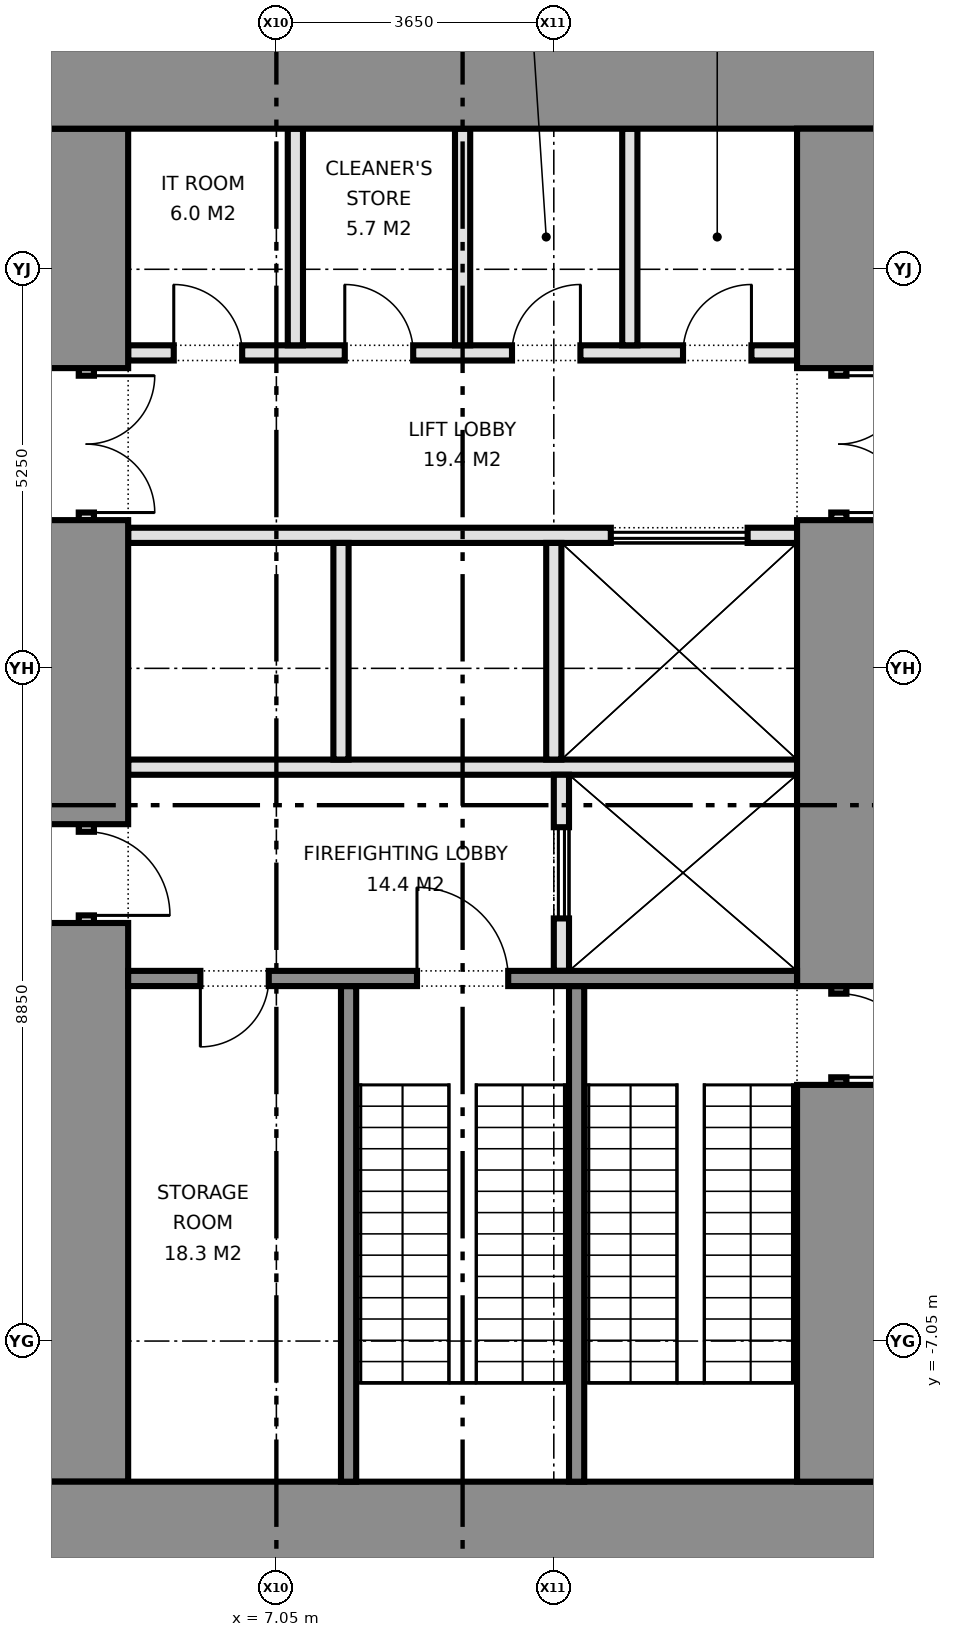
"""IFC4 building model, lengths in metres.
Left out: names, types, materials, properties, quantities, classifications, styles, units other than length and angle.
Written with IfcOpenShell. Run it as: python <this file> out.ifc"""

import sys

from ifc_helpers import new_model, si_unit, direction, frame, frame_2d, origin, place, context, subcontext, project, spatial, rectangle, extrude, element, fill, save


model = new_model("IFC4")
c1 = context("Model", 3, precision=1e-05, world=origin(), true_north=direction((0.0, 1.0)))
c2 = subcontext(c1, "Body", "Model", "MODEL_VIEW")
j1 = project(units=[si_unit("LENGTHUNIT", "METRE"), si_unit("PLANEANGLEUNIT", "RADIAN")], contexts=[c1])
p1 = place(None, origin())
s1 = spatial("IfcSite", under=j1, at=p1, CompositionType="ELEMENT")
p2 = place(p1, origin())
s2 = spatial("IfcBuilding", under=s1, at=p2, CompositionType="ELEMENT")
p3 = place(p2, frame((0.0, 0.0, -10.0)))
s3 = spatial("IfcBuildingStorey", under=s2, at=p3, CompositionType="ELEMENT", Elevation=-10.0)
for number, where, z_axis, x_axis in (
    (1, (15.0, 9.45, 0.0), (0.0, 0.0, 1.0), (-1.0, 0.0, 0.0)),
    (2, (15.0, -9.45, 0.0), (0.0, 0.0, 1.0), (-1.0, 0.0, 0.0)),
):
    element("IfcWall", number, at=place(p3, frame(where, z_axis=z_axis, x_axis=x_axis)), inside=s3, PredefinedType="SHEAR", context=c2, shape_type="SweptSolid", body=[
        extrude(rectangle(XDim=11.0, YDim=1.1, at=frame_2d((5.5, 0.0))), origin(), (0.0, 0.0, 1.0), 4.7),
    ])
p4 = place(p3, frame((14.45, 8.9, 0.0), z_axis=(0.0, 0.0, 1.0), x_axis=(0.0, -1.0, 0.0)))
e3 = element("IfcWall", 3, at=p4, inside=s3, PredefinedType="SHEAR", context=c2, shape_type="SweptSolid", body=[
    extrude(rectangle(XDim=3.15, YDim=1.1, at=frame_2d((1.575, 0.0))), origin(), (0.0, 0.0, 1.0), 4.7),
])
p5 = place(p3, frame((14.45, 5.75, 0.0), z_axis=(0.0, 0.0, 1.0), x_axis=(0.0, -1.0, 0.0)))
e4 = element("IfcWall", 4, at=p5, inside=s3, PredefinedType="PARTITIONING", context=c2, shape_type="SweptSolid", body=[
    extrude(rectangle(XDim=2.0, YDim=0.2, at=frame_2d((1.0, 0.0))), origin(), (0.0, 0.0, 1.0), 2.4),
])
p6 = place(p5, frame((0.1, 0.0, 0.0)))
e5 = element("IfcOpeningElement", 5, at=p6, cuts=e4, PredefinedType="OPENING", context=c2, shape_type="SweptSolid", body=[
    extrude(rectangle(XDim=1.8, YDim=2.1, at=frame_2d((0.9, 1.05))), frame((0.0, 0.11, 0.0), z_axis=(0.0, -1.0, 0.0), x_axis=(1.0, 0.0, 0.0)), (0.0, 0.0, 1.0), 0.22),
])
p7 = place(p3, frame((14.45, 3.75, 0.0), z_axis=(0.0, 0.0, 1.0), x_axis=(0.0, -1.0, 0.0)))
e6 = element("IfcWall", 6, at=p7, inside=s3, PredefinedType="SHEAR", context=c2, shape_type="SweptSolid", body=[
    extrude(rectangle(XDim=6.13, YDim=1.1, at=frame_2d((3.065, 0.0))), origin(), (0.0, 0.0, 1.0), 4.7),
])
p8 = place(p3, frame((14.45, -2.38, 0.0), z_axis=(0.0, 0.0, 1.0), x_axis=(0.0, -1.0, 0.0)))
e7 = element("IfcWall", 7, at=p8, inside=s3, PredefinedType="SHEAR", context=c2, shape_type="SweptSolid", body=[
    extrude(rectangle(XDim=1.3, YDim=0.2, at=frame_2d((0.65, 0.0))), origin(), (0.0, 0.0, 1.0), 2.4),
])
p9 = place(p8, frame((0.1, 0.0, 0.0)))
e8 = element("IfcOpeningElement", 8, at=p9, cuts=e7, PredefinedType="OPENING", context=c2, shape_type="SweptSolid", body=[
    extrude(rectangle(XDim=1.1, YDim=2.1, at=frame_2d((0.55, 1.05))), frame((0.0, 0.11, 0.0), z_axis=(0.0, -1.0, 0.0), x_axis=(1.0, 0.0, 0.0)), (0.0, 0.0, 1.0), 0.22),
])
p10 = place(p3, frame((14.45, -3.68, 0.0), z_axis=(0.0, 0.0, 1.0), x_axis=(0.0, -1.0, 0.0)))
e9 = element("IfcWall", 9, at=p10, inside=s3, PredefinedType="SHEAR", context=c2, shape_type="SweptSolid", body=[
    extrude(rectangle(XDim=5.22, YDim=1.1, at=frame_2d((2.61, 0.0))), origin(), (0.0, 0.0, 1.0), 4.7),
])
p11 = place(p3, frame((4.55, 8.9, 0.0), z_axis=(0.0, 0.0, 1.0), x_axis=(0.0, -1.0, 0.0)))
e10 = element("IfcWall", 10, at=p11, inside=s3, PredefinedType="SHEAR", context=c2, shape_type="SweptSolid", body=[
    extrude(rectangle(XDim=3.15, YDim=1.1, at=frame_2d((1.575, 0.0))), origin(), (0.0, 0.0, 1.0), 4.7),
])
p12 = place(p3, frame((4.55, 5.75, 0.0), z_axis=(0.0, 0.0, 1.0), x_axis=(0.0, -1.0, 0.0)))
e11 = element("IfcWall", 11, at=p12, inside=s3, PredefinedType="PARTITIONING", context=c2, shape_type="SweptSolid", body=[
    extrude(rectangle(XDim=2.0, YDim=0.2, at=frame_2d((1.0, 0.0))), origin(), (0.0, 0.0, 1.0), 2.4),
])
p13 = place(p12, frame((0.1, 0.0, 0.0)))
e12 = element("IfcOpeningElement", 12, at=p13, cuts=e11, PredefinedType="OPENING", context=c2, shape_type="SweptSolid", body=[
    extrude(rectangle(XDim=1.8, YDim=2.1, at=frame_2d((0.9, 1.05))), frame((0.0, 0.11, 0.0), z_axis=(0.0, -1.0, 0.0), x_axis=(1.0, 0.0, 0.0)), (0.0, 0.0, 1.0), 0.22),
])
p14 = place(p3, frame((4.55, 3.75, 0.0), z_axis=(0.0, 0.0, 1.0), x_axis=(0.0, -1.0, 0.0)))
e13 = element("IfcWall", 13, at=p14, inside=s3, PredefinedType="SHEAR", context=c2, shape_type="SweptSolid", body=[
    extrude(rectangle(XDim=4.0, YDim=1.1, at=frame_2d((2.0, 0.0))), origin(), (0.0, 0.0, 1.0), 4.7),
])
p15 = place(p3, frame((4.55, -0.25, 0.0), z_axis=(0.0, 0.0, 1.0), x_axis=(0.0, -1.0, 0.0)))
e14 = element("IfcWall", 14, at=p15, inside=s3, PredefinedType="PARTITIONING", context=c2, shape_type="SweptSolid", body=[
    extrude(rectangle(XDim=1.3, YDim=0.2, at=frame_2d((0.65, 0.0))), origin(), (0.0, 0.0, 1.0), 2.4),
])
p16 = place(p15, frame((0.1, 0.0, 0.0)))
e15 = element("IfcOpeningElement", 15, at=p16, cuts=e14, PredefinedType="OPENING", context=c2, shape_type="SweptSolid", body=[
    extrude(rectangle(XDim=1.1, YDim=2.1, at=frame_2d((0.55, 1.05))), frame((0.0, 0.11, 0.0), z_axis=(0.0, -1.0, 0.0), x_axis=(1.0, 0.0, 0.0)), (0.0, 0.0, 1.0), 0.22),
])
p17 = place(p3, frame((4.55, -1.55, 0.0), z_axis=(0.0, 0.0, 1.0), x_axis=(0.0, -1.0, 0.0)))
e16 = element("IfcWall", 16, at=p17, inside=s3, PredefinedType="SHEAR", context=c2, shape_type="SweptSolid", body=[
    extrude(rectangle(XDim=7.35, YDim=1.1, at=frame_2d((3.675, 0.0))), origin(), (0.0, 0.0, 1.0), 4.7),
])
p18 = place(p3, frame((13.9, 5.95, 0.0), z_axis=(0.0, 0.0, 1.0), x_axis=(-1.0, 0.0, 0.0)))
e17 = element("IfcWall", 17, at=p18, inside=s3, PredefinedType="PARTITIONING", context=c2, shape_type="SweptSolid", body=[
    extrude(rectangle(XDim=8.8, YDim=0.2, at=frame_2d((4.4, 0.0))), origin(), (0.0, 0.0, 1.0), 4.7),
])
p19 = place(p18, frame((0.6, 0.0, 0.0)))
e18 = element("IfcOpeningElement", 18, at=p19, cuts=e17, PredefinedType="OPENING", context=c2, shape_type="SweptSolid", body=[
    extrude(rectangle(XDim=0.9, YDim=2.1, at=frame_2d((0.45, 1.05))), frame((0.0, 0.11, 0.0), z_axis=(0.0, -1.0, 0.0), x_axis=(1.0, 0.0, 0.0)), (0.0, 0.0, 1.0), 0.22),
])
p20 = place(p18, frame((2.85, 0.0, 0.0)))
e19 = element("IfcOpeningElement", 19, at=p20, cuts=e17, PredefinedType="OPENING", context=c2, shape_type="SweptSolid", body=[
    extrude(rectangle(XDim=0.9, YDim=2.1, at=frame_2d((0.45, 1.05))), frame((0.0, 0.11, 0.0), z_axis=(0.0, -1.0, 0.0), x_axis=(1.0, 0.0, 0.0)), (0.0, 0.0, 1.0), 0.22),
])
p21 = place(p18, frame((5.05, 0.0, 0.0)))
e20 = element("IfcOpeningElement", 20, at=p21, cuts=e17, PredefinedType="OPENING", context=c2, shape_type="SweptSolid", body=[
    extrude(rectangle(XDim=0.9, YDim=2.1, at=frame_2d((0.45, 1.05))), frame((0.0, 0.11, 0.0), z_axis=(0.0, -1.0, 0.0), x_axis=(1.0, 0.0, 0.0)), (0.0, 0.0, 1.0), 0.22),
])
p22 = place(p18, frame((7.3, 0.0, 0.0)))
e21 = element("IfcOpeningElement", 21, at=p22, cuts=e17, PredefinedType="OPENING", context=c2, shape_type="SweptSolid", body=[
    extrude(rectangle(XDim=0.9, YDim=2.1, at=frame_2d((0.45, 1.05))), frame((0.0, 0.11, 0.0), z_axis=(0.0, -1.0, 0.0), x_axis=(1.0, 0.0, 0.0)), (0.0, 0.0, 1.0), 0.22),
])
p23 = place(p3, frame((13.9, 3.55, 0.0), z_axis=(0.0, 0.0, 1.0), x_axis=(-1.0, 0.0, 0.0)))
e22 = element("IfcWall", 22, at=p23, inside=s3, PredefinedType="PARTITIONING", context=c2, shape_type="SweptSolid", body=[
    extrude(rectangle(XDim=8.8, YDim=0.2, at=frame_2d((4.4, 0.0))), origin(), (0.0, 0.0, 1.0), 4.7),
])
p24 = place(p23, frame((0.65, 0.0, 0.0)))
e23 = element("IfcOpeningElement", 23, at=p24, cuts=e22, PredefinedType="OPENING", context=c2, shape_type="SweptSolid", body=[
    extrude(rectangle(XDim=1.8, YDim=2.1, at=frame_2d((0.9, 1.05))), frame((0.0, 0.11, 0.0), z_axis=(0.0, -1.0, 0.0), x_axis=(1.0, 0.0, 0.0)), (0.0, 0.0, 1.0), 0.22),
])
p25 = place(p3, frame((13.9, 0.5, 0.0), z_axis=(0.0, 0.0, 1.0), x_axis=(-1.0, 0.0, 0.0)))
e24 = element("IfcWall", 24, at=p25, inside=s3, PredefinedType="PARTITIONING", context=c2, shape_type="SweptSolid", body=[
    extrude(rectangle(XDim=8.8, YDim=0.2, at=frame_2d((4.4, 0.0))), origin(), (0.0, 0.0, 1.0), 4.7),
])
p26 = place(p3, frame((10.8, 0.4, 0.0), z_axis=(0.0, 0.0, 1.0), x_axis=(0.0, -1.0, 0.0)))
e25 = element("IfcWall", 25, at=p26, inside=s3, PredefinedType="PARTITIONING", context=c2, shape_type="SweptSolid", body=[
    extrude(rectangle(XDim=2.58, YDim=0.2, at=frame_2d((1.29, 0.0))), origin(), (0.0, 0.0, 1.0), 4.7),
])
p27 = place(p26, frame((0.69, 0.0, 0.0)))
e26 = element("IfcOpeningElement", 26, at=p27, cuts=e25, PredefinedType="OPENING", context=c2, shape_type="SweptSolid", body=[
    extrude(rectangle(XDim=1.2, YDim=2.1, at=frame_2d((0.6, 1.05))), frame((0.0, 0.11, 0.0), z_axis=(0.0, -1.0, 0.0), x_axis=(1.0, 0.0, 0.0)), (0.0, 0.0, 1.0), 0.22),
])
p28 = place(p3, frame((13.9, -2.28, 0.0), z_axis=(0.0, 0.0, 1.0), x_axis=(-1.0, 0.0, 0.0)))
e27 = element("IfcWall", 27, at=p28, inside=s3, PredefinedType="SHEAR", context=c2, shape_type="SweptSolid", body=[
    extrude(rectangle(XDim=8.8, YDim=0.2, at=frame_2d((4.4, 0.0))), origin(), (0.0, 0.0, 1.0), 4.7),
])
p29 = place(p28, frame((3.8, 0.0, 0.0)))
e28 = element("IfcOpeningElement", 28, at=p29, cuts=e27, PredefinedType="OPENING", context=c2, shape_type="SweptSolid", body=[
    extrude(rectangle(XDim=1.2, YDim=2.1, at=frame_2d((0.6, 1.05))), frame((0.0, 0.11, 0.0), z_axis=(0.0, -1.0, 0.0), x_axis=(1.0, 0.0, 0.0)), (0.0, 0.0, 1.0), 0.22),
])
p30 = place(p28, frame((6.95, 0.0, 0.0)))
e29 = element("IfcOpeningElement", 29, at=p30, cuts=e27, PredefinedType="OPENING", context=c2, shape_type="SweptSolid", body=[
    extrude(rectangle(XDim=0.9, YDim=2.1, at=frame_2d((0.45, 1.05))), frame((0.0, 0.11, 0.0), z_axis=(0.0, -1.0, 0.0), x_axis=(1.0, 0.0, 0.0)), (0.0, 0.0, 1.0), 0.22),
])
for number, where, z_axis, x_axis in (
    (30, (11.0, -2.38, 0.0), (0.0, 0.0, 1.0), (0.0, -1.0, 0.0)),
    (31, (8.0, -2.38, 0.0), (0.0, 0.0, 1.0), (0.0, -1.0, 0.0)),
):
    element("IfcWall", number, at=place(p3, frame(where, z_axis=z_axis, x_axis=x_axis)), inside=s3, PredefinedType="SHEAR", context=c2, shape_type="SweptSolid", body=[
        extrude(rectangle(XDim=6.52, YDim=0.2, at=frame_2d((3.26, 0.0))), origin(), (0.0, 0.0, 1.0), 4.7),
    ])
for number, where, z_axis, x_axis in (
    (32, (11.7, 8.9, 0.0), (0.0, 0.0, 1.0), (0.0, -1.0, 0.0)),
    (33, (9.5, 8.9, 0.0), (0.0, 0.0, 1.0), (0.0, -1.0, 0.0)),
    (34, (7.3, 8.9, 0.0), (0.0, 0.0, 1.0), (0.0, -1.0, 0.0)),
    (35, (10.7, 3.45, 0.0), (0.0, 0.0, 1.0), (0.0, -1.0, 0.0)),
    (36, (7.9, 3.45, 0.0), (0.0, 0.0, 1.0), (0.0, -1.0, 0.0)),
):
    element("IfcWall", number, at=place(p3, frame(where, z_axis=z_axis, x_axis=x_axis)), inside=s3, PredefinedType="PARTITIONING", context=c2, shape_type="SweptSolid", body=[
        extrude(rectangle(XDim=2.85, YDim=0.2, at=frame_2d((1.425, 0.0))), origin(), (0.0, 0.0, 1.0), 4.7),
    ])
p31 = place(p6, origin())
e37 = element("IfcDoor", 37, at=p31, inside=s3, OperationType="DOUBLE_DOOR_SINGLE_SWING", PredefinedType="DOOR", context=c2, shape_type="SweptSolid", body=[
    extrude(rectangle(XDim=1.8, YDim=2.1, at=frame_2d((0.9, 1.05))), frame((0.0, 0.025, 0.0), z_axis=(0.0, -1.0, 0.0), x_axis=(1.0, 0.0, 0.0)), (0.0, 0.0, 1.0), 0.05),
])
fill(e5, e37)
p32 = place(p9, origin())
e38 = element("IfcDoor", 38, at=p32, inside=s3, OperationType="SINGLE_SWING_RIGHT", PredefinedType="DOOR", context=c2, shape_type="SweptSolid", body=[
    extrude(rectangle(XDim=1.1, YDim=2.1, at=frame_2d((0.55, 1.05))), frame((0.0, 0.025, 0.0), z_axis=(0.0, -1.0, 0.0), x_axis=(1.0, 0.0, 0.0)), (0.0, 0.0, 1.0), 0.05),
])
fill(e8, e38)
p33 = place(p13, origin())
e39 = element("IfcDoor", 39, at=p33, inside=s3, OperationType="DOUBLE_DOOR_SINGLE_SWING", PredefinedType="DOOR", context=c2, shape_type="SweptSolid", body=[
    extrude(rectangle(XDim=1.8, YDim=2.1, at=frame_2d((0.9, 1.05))), frame((0.0, 0.025, 0.0), z_axis=(0.0, -1.0, 0.0), x_axis=(1.0, 0.0, 0.0)), (0.0, 0.0, 1.0), 0.05),
])
fill(e12, e39)
p34 = place(p16, origin())
e40 = element("IfcDoor", 40, at=p34, inside=s3, OperationType="SINGLE_SWING_RIGHT", PredefinedType="DOOR", context=c2, shape_type="SweptSolid", body=[
    extrude(rectangle(XDim=1.1, YDim=2.1, at=frame_2d((0.55, 1.05))), frame((0.0, 0.025, 0.0), z_axis=(0.0, -1.0, 0.0), x_axis=(1.0, 0.0, 0.0)), (0.0, 0.0, 1.0), 0.05),
])
fill(e15, e40)
p35 = place(p24, origin())
e41 = element("IfcDoor", 41, at=p35, inside=s3, OperationType="DOUBLE_DOOR_SLIDING", PredefinedType="DOOR", context=c2, shape_type="SweptSolid", body=[
    extrude(rectangle(XDim=1.8, YDim=2.1, at=frame_2d((0.9, 1.05))), frame((0.0, 0.025, 0.0), z_axis=(0.0, -1.0, 0.0), x_axis=(1.0, 0.0, 0.0)), (0.0, 0.0, 1.0), 0.05),
])
fill(e23, e41)
p36 = place(p27, origin())
e42 = element("IfcDoor", 42, at=p36, inside=s3, OperationType="DOUBLE_DOOR_SLIDING", PredefinedType="DOOR", context=c2, shape_type="SweptSolid", body=[
    extrude(rectangle(XDim=1.2, YDim=2.1, at=frame_2d((0.6, 1.05))), frame((0.0, 0.025, 0.0), z_axis=(0.0, -1.0, 0.0), x_axis=(1.0, 0.0, 0.0)), (0.0, 0.0, 1.0), 0.05),
])
fill(e26, e42)
p37 = place(p19, frame((0.9, 0.0, 0.0), z_axis=(0.0, 0.0, 1.0), x_axis=(-1.0, 0.0, 0.0)))
e43 = element("IfcDoor", 43, at=p37, inside=s3, OperationType="SINGLE_SWING_RIGHT", PredefinedType="DOOR", context=c2, shape_type="SweptSolid", body=[
    extrude(rectangle(XDim=0.9, YDim=2.1, at=frame_2d((0.45, 1.05))), frame((0.0, 0.025, 0.0), z_axis=(0.0, -1.0, 0.0), x_axis=(1.0, 0.0, 0.0)), (0.0, 0.0, 1.0), 0.05),
])
fill(e18, e43)
p38 = place(p20, frame((0.9, 0.0, 0.0), z_axis=(0.0, 0.0, 1.0), x_axis=(-1.0, 0.0, 0.0)))
e44 = element("IfcDoor", 44, at=p38, inside=s3, OperationType="SINGLE_SWING_RIGHT", PredefinedType="DOOR", context=c2, shape_type="SweptSolid", body=[
    extrude(rectangle(XDim=0.9, YDim=2.1, at=frame_2d((0.45, 1.05))), frame((0.0, 0.025, 0.0), z_axis=(0.0, -1.0, 0.0), x_axis=(1.0, 0.0, 0.0)), (0.0, 0.0, 1.0), 0.05),
])
fill(e19, e44)
p39 = place(p21, frame((0.9, 0.0, 0.0), z_axis=(0.0, 0.0, 1.0), x_axis=(-1.0, 0.0, 0.0)))
e45 = element("IfcDoor", 45, at=p39, inside=s3, OperationType="SINGLE_SWING_LEFT", PredefinedType="DOOR", context=c2, shape_type="SweptSolid", body=[
    extrude(rectangle(XDim=0.9, YDim=2.1, at=frame_2d((0.45, 1.05))), frame((0.0, 0.025, 0.0), z_axis=(0.0, -1.0, 0.0), x_axis=(1.0, 0.0, 0.0)), (0.0, 0.0, 1.0), 0.05),
])
fill(e20, e45)
p40 = place(p22, frame((0.9, 0.0, 0.0), z_axis=(0.0, 0.0, 1.0), x_axis=(-1.0, 0.0, 0.0)))
e46 = element("IfcDoor", 46, at=p40, inside=s3, OperationType="SINGLE_SWING_LEFT", PredefinedType="DOOR", context=c2, shape_type="SweptSolid", body=[
    extrude(rectangle(XDim=0.9, YDim=2.1, at=frame_2d((0.45, 1.05))), frame((0.0, 0.025, 0.0), z_axis=(0.0, -1.0, 0.0), x_axis=(1.0, 0.0, 0.0)), (0.0, 0.0, 1.0), 0.05),
])
fill(e21, e46)
p41 = place(p29, frame((1.2, 0.0, 0.0), z_axis=(0.0, 0.0, 1.0), x_axis=(-1.0, 0.0, 0.0)))
e47 = element("IfcDoor", 47, at=p41, inside=s3, OperationType="SINGLE_SWING_LEFT", PredefinedType="DOOR", context=c2, shape_type="SweptSolid", body=[
    extrude(rectangle(XDim=1.2, YDim=2.1, at=frame_2d((0.6, 1.05))), frame((0.0, 0.025, 0.0), z_axis=(0.0, -1.0, 0.0), x_axis=(1.0, 0.0, 0.0)), (0.0, 0.0, 1.0), 0.05),
])
fill(e28, e47)
p42 = place(p30, origin())
e48 = element("IfcDoor", 48, at=p42, inside=s3, OperationType="SINGLE_SWING_RIGHT", PredefinedType="DOOR", context=c2, shape_type="SweptSolid", body=[
    extrude(rectangle(XDim=0.9, YDim=2.1, at=frame_2d((0.45, 1.05))), frame((0.0, 0.025, 0.0), z_axis=(0.0, -1.0, 0.0), x_axis=(1.0, 0.0, 0.0)), (0.0, 0.0, 1.0), 0.05),
])
fill(e29, e48)
save(model, sys.argv[1])
